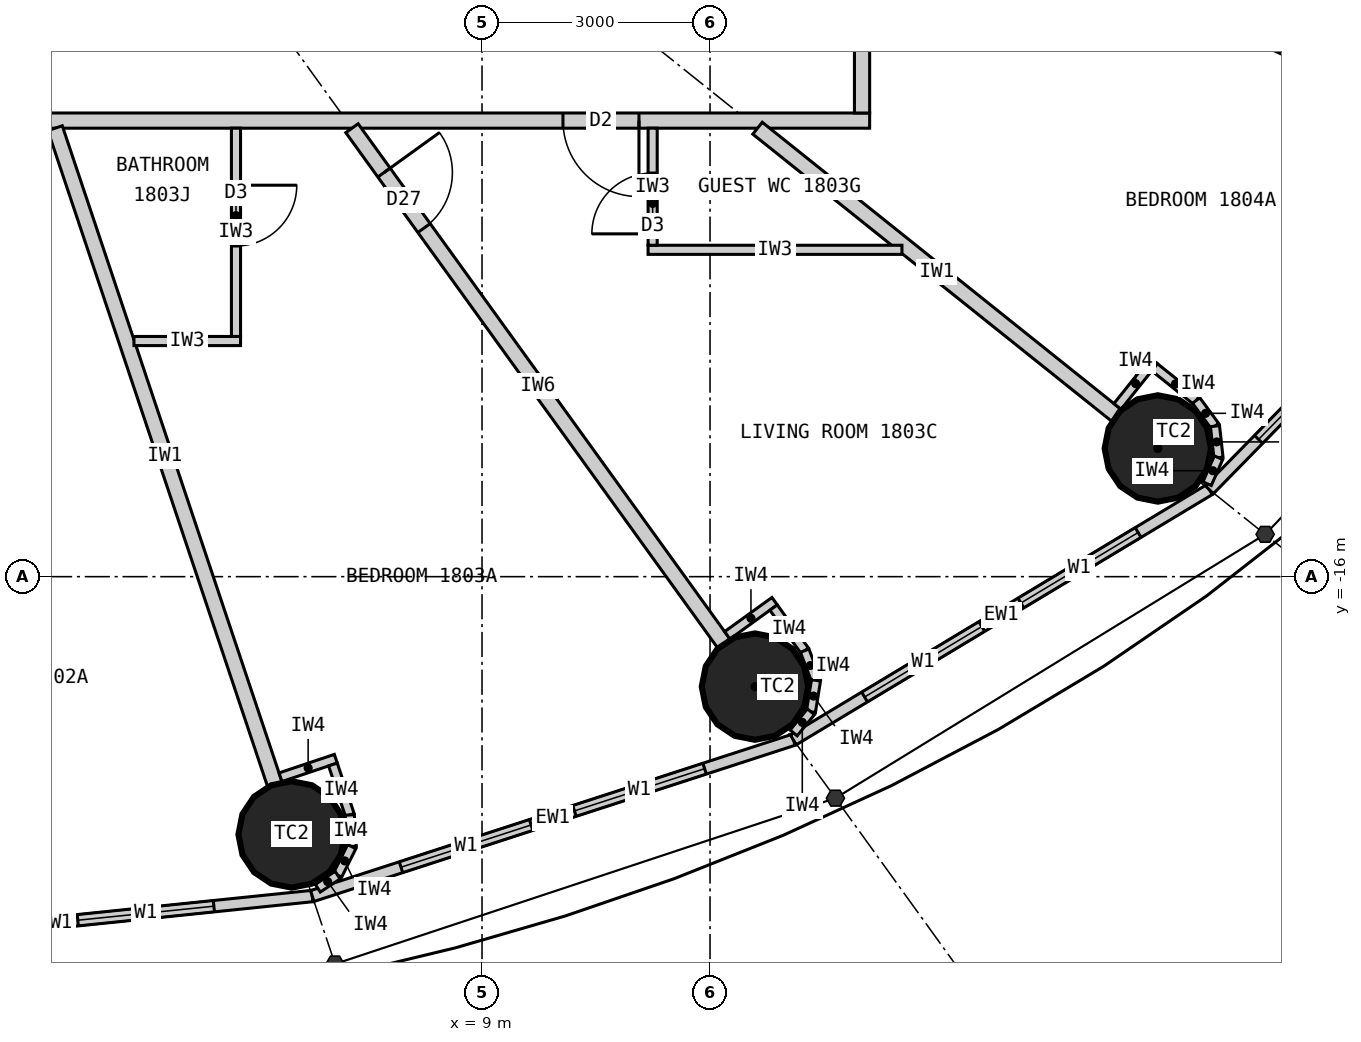
"""IFC4 building model, lengths in metres.
Left out: names, types, materials, properties, quantities, classifications, styles, units other than length and angle.
Written with IfcOpenShell. Run it as: python <this file> out.ifc"""

import sys

from ifc_helpers import new_model, si_unit, direction, frame, frame_2d, origin, origin_2d, place, context, subcontext, project, spatial, rectangle, circle, extrude, element, fill, save


model = new_model("IFC4")
c1 = context("Model", 3, precision=1e-05, world=origin(), true_north=direction((0.0, 1.0)))
c2 = subcontext(c1, "Body", "Model", "MODEL_VIEW")
j1 = project(units=[si_unit("LENGTHUNIT", "METRE"), si_unit("PLANEANGLEUNIT", "RADIAN")], contexts=[c1])
p1 = place(None, origin())
s1 = spatial("IfcSite", under=j1, at=p1, CompositionType="ELEMENT")
p2 = place(p1, origin())
s2 = spatial("IfcBuilding", under=s1, at=p2, CompositionType="ELEMENT")
p3 = place(p2, frame((0.0, 0.0, 73.8)))
s3 = spatial("IfcBuildingStorey", under=s2, at=p3, CompositionType="ELEMENT", Elevation=73.8)
for number, where, z_axis, x_axis in (
    (1, (6.495, -19.391, 0.0), (0.0, 0.0, 1.0), (1.0, 0.0, 0.0)),
    (2, (12.591, -17.447, 0.0), (0.0, 0.0, 1.0), (1.0, 0.0, 0.0)),
    (3, (17.892, -14.313, 0.0), (0.0, 0.0, 1.0), (1.0, 0.0, 0.0)),
):
    element("IfcColumn", number, at=place(p3, frame(where, z_axis=z_axis, x_axis=x_axis)), inside=s3, PredefinedType="COLUMN", context=c2, shape_type="SweptSolid", body=[
        extrude(circle(Radius=0.7, at=origin_2d()), origin(), (0.0, 0.0, 1.0), 3.3),
    ])
p4 = place(p3, frame((0.0, -20.9, 0.0), z_axis=(0.0, 0.0, 1.0), x_axis=(0.994721394369, 0.102612609291, 0.0)))
e4 = element("IfcWall", 4, at=p4, inside=s3, PredefinedType="ELEMENTEDWALL", context=c2, shape_type="SweptSolid", body=[
    extrude(rectangle(XDim=6.802, YDim=0.15, at=frame_2d((3.401, 0.0))), origin(), (0.0, 0.0, 1.0), 3.12),
])
p5 = place(p4, frame((1.301, 0.0, 0.9)))
e5 = element("IfcOpeningElement", 5, at=p5, cuts=e4, PredefinedType="OPENING", context=c2, shape_type="SweptSolid", body=[
    extrude(rectangle(XDim=1.8, YDim=1.9, at=frame_2d((0.9, 0.95))), frame((0.0, 0.085, 0.0), z_axis=(0.0, -1.0, 0.0), x_axis=(1.0, 0.0, 0.0)), (0.0, 0.0, 1.0), 0.17),
])
p6 = place(p4, frame((3.701, 0.0, 0.9)))
e6 = element("IfcOpeningElement", 6, at=p6, cuts=e4, PredefinedType="OPENING", context=c2, shape_type="SweptSolid", body=[
    extrude(rectangle(XDim=1.8, YDim=1.9, at=frame_2d((0.9, 0.95))), frame((0.0, 0.085, 0.0), z_axis=(0.0, -1.0, 0.0), x_axis=(1.0, 0.0, 0.0)), (0.0, 0.0, 1.0), 0.17),
])
p7 = place(p3, frame((6.766, -20.202, 0.0), z_axis=(0.0, 0.0, 1.0), x_axis=(0.951137534625, 0.308767534285, 0.0)))
e7 = element("IfcWall", 7, at=p7, inside=s3, PredefinedType="ELEMENTEDWALL", context=c2, shape_type="SweptSolid", body=[
    extrude(rectangle(XDim=6.655, YDim=0.15, at=frame_2d((3.328, 0.0))), origin(), (0.0, 0.0, 1.0), 3.12),
])
p8 = place(p7, frame((1.228, 0.0, 0.9)))
e8 = element("IfcOpeningElement", 8, at=p8, cuts=e7, PredefinedType="OPENING", context=c2, shape_type="SweptSolid", body=[
    extrude(rectangle(XDim=1.8, YDim=1.9, at=frame_2d((0.9, 0.95))), frame((0.0, 0.085, 0.0), z_axis=(0.0, -1.0, 0.0), x_axis=(1.0, 0.0, 0.0)), (0.0, 0.0, 1.0), 0.17),
])
p9 = place(p7, frame((3.628, 0.0, 0.9)))
e9 = element("IfcOpeningElement", 9, at=p9, cuts=e7, PredefinedType="OPENING", context=c2, shape_type="SweptSolid", body=[
    extrude(rectangle(XDim=1.8, YDim=1.9, at=frame_2d((0.9, 0.95))), frame((0.0, 0.085, 0.0), z_axis=(0.0, -1.0, 0.0), x_axis=(1.0, 0.0, 0.0)), (0.0, 0.0, 1.0), 0.17),
])
p10 = place(p3, frame((13.096, -18.147, 0.0), z_axis=(0.0, 0.0, 1.0), x_axis=(0.856983180864, 0.515344377787, 0.0)))
e10 = element("IfcWall", 10, at=p10, inside=s3, PredefinedType="ELEMENTEDWALL", context=c2, shape_type="SweptSolid", body=[
    extrude(rectangle(XDim=6.386, YDim=0.15, at=frame_2d((3.193, 0.0))), origin(), (0.0, 0.0, 1.0), 3.12),
])
p11 = place(p10, frame((1.093, 0.0, 0.9)))
e11 = element("IfcOpeningElement", 11, at=p11, cuts=e10, PredefinedType="OPENING", context=c2, shape_type="SweptSolid", body=[
    extrude(rectangle(XDim=1.8, YDim=1.9, at=frame_2d((0.9, 0.95))), frame((0.0, 0.085, 0.0), z_axis=(0.0, -1.0, 0.0), x_axis=(1.0, 0.0, 0.0)), (0.0, 0.0, 1.0), 0.17),
])
p12 = place(p10, frame((3.493, 0.0, 0.9)))
e12 = element("IfcOpeningElement", 12, at=p12, cuts=e10, PredefinedType="OPENING", context=c2, shape_type="SweptSolid", body=[
    extrude(rectangle(XDim=1.8, YDim=1.9, at=frame_2d((0.9, 0.95))), frame((0.0, 0.085, 0.0), z_axis=(0.0, -1.0, 0.0), x_axis=(1.0, 0.0, 0.0)), (0.0, 0.0, 1.0), 0.17),
])
p13 = place(p3, frame((18.57, -14.856, 0.0), z_axis=(0.0, 0.0, 1.0), x_axis=(0.699602905915, 0.714531856557, 0.0)))
e13 = element("IfcWall", 13, at=p13, inside=s3, PredefinedType="ELEMENTEDWALL", context=c2, shape_type="SweptSolid", body=[
    extrude(rectangle(XDim=6.051, YDim=0.15, at=frame_2d((3.025, 0.0))), origin(), (0.0, 0.0, 1.0), 3.12),
])
p14 = place(p13, frame((0.926, 0.0, 0.9)))
e14 = element("IfcOpeningElement", 14, at=p14, cuts=e13, PredefinedType="OPENING", context=c2, shape_type="SweptSolid", body=[
    extrude(rectangle(XDim=1.8, YDim=1.9, at=frame_2d((0.9, 0.95))), frame((0.0, 0.085, 0.0), z_axis=(0.0, -1.0, 0.0), x_axis=(1.0, 0.0, 0.0)), (0.0, 0.0, 1.0), 0.17),
])
p15 = place(p13, frame((3.325, 0.0, 0.9)))
e15 = element("IfcOpeningElement", 15, at=p15, cuts=e13, PredefinedType="OPENING", context=c2, shape_type="SweptSolid", body=[
    extrude(rectangle(XDim=1.8, YDim=1.9, at=frame_2d((0.9, 0.95))), frame((0.0, 0.085, 0.0), z_axis=(0.0, -1.0, 0.0), x_axis=(1.0, 0.0, 0.0)), (0.0, 0.0, 1.0), 0.17),
])
p16 = place(p3, frame((14.1, -10.0, 0.0), z_axis=(0.0, 0.0, 1.0), x_axis=(-1.0, 0.0, 0.0)))
e16 = element("IfcWall", 16, at=p16, inside=s3, PredefinedType="PARTITIONING", context=c2, shape_type="SweptSolid", body=[
    extrude(rectangle(XDim=28.2, YDim=0.2, at=frame_2d((14.1, 0.0))), origin(), (0.0, 0.0, 1.0), 3.12),
])
p17 = place(p16, frame((24.165, 0.0, 0.0)))
e17 = element("IfcOpeningElement", 17, at=p17, cuts=e16, PredefinedType="OPENING", context=c2, shape_type="SweptSolid", body=[
    extrude(rectangle(XDim=1.0, YDim=2.2, at=frame_2d((0.5, 1.1))), frame((0.0, 0.11, 0.0), z_axis=(0.0, -1.0, 0.0), x_axis=(1.0, 0.0, 0.0)), (0.0, 0.0, 1.0), 0.22),
])
p18 = place(p16, frame((14.923, 0.0, 0.0)))
e18 = element("IfcOpeningElement", 18, at=p18, cuts=e16, PredefinedType="OPENING", context=c2, shape_type="SweptSolid", body=[
    extrude(rectangle(XDim=1.0, YDim=2.2, at=frame_2d((0.5, 1.1))), frame((0.0, 0.11, 0.0), z_axis=(0.0, -1.0, 0.0), x_axis=(1.0, 0.0, 0.0)), (0.0, 0.0, 1.0), 0.22),
])
p19 = place(p16, frame((3.035, 0.0, 0.0)))
e19 = element("IfcOpeningElement", 19, at=p19, cuts=e16, PredefinedType="OPENING", context=c2, shape_type="SweptSolid", body=[
    extrude(rectangle(XDim=1.0, YDim=2.2, at=frame_2d((0.5, 1.1))), frame((0.0, 0.11, 0.0), z_axis=(0.0, -1.0, 0.0), x_axis=(1.0, 0.0, 0.0)), (0.0, 0.0, 1.0), 0.22),
])
p20 = place(p3, frame((3.383, -10.1, 0.0), z_axis=(0.0, 0.0, 1.0), x_axis=(0.31759592231, -0.948226149256, 0.0)))
e20 = element("IfcWall", 20, at=p20, inside=s3, PredefinedType="PARTITIONING", context=c2, shape_type="SweptSolid", body=[
    extrude(rectangle(XDim=9.098, YDim=0.2, at=frame_2d((4.549, 0.0))), origin(), (0.0, 0.0, 1.0), 2.32),
])
p21 = place(p3, frame((7.289, -10.1, 0.0), z_axis=(0.0, 0.0, 1.0), x_axis=(0.585198353053, -0.810890182197, 0.0)))
e21 = element("IfcWall", 21, at=p21, inside=s3, PredefinedType="PARTITIONING", context=c2, shape_type="SweptSolid", body=[
    extrude(rectangle(XDim=8.36, YDim=0.2, at=frame_2d((4.18, 0.0))), origin(), (0.0, 0.0, 1.0), 2.32),
])
p22 = place(p21, frame((0.72, 0.0, 0.0)))
e22 = element("IfcOpeningElement", 22, at=p22, cuts=e21, PredefinedType="OPENING", context=c2, shape_type="SweptSolid", body=[
    extrude(rectangle(XDim=0.9, YDim=2.1, at=frame_2d((0.45, 1.05))), frame((0.0, 0.11, 0.0), z_axis=(0.0, -1.0, 0.0), x_axis=(1.0, 0.0, 0.0)), (0.0, 0.0, 1.0), 0.22),
])
p23 = place(p3, frame((12.625, -10.1, 0.0), z_axis=(0.0, 0.0, 1.0), x_axis=(0.780892451574, -0.624665493744, 0.0)))
e23 = element("IfcWall", 23, at=p23, inside=s3, PredefinedType="PARTITIONING", context=c2, shape_type="SweptSolid", body=[
    extrude(rectangle(XDim=6.045, YDim=0.2, at=frame_2d((3.022, 0.0))), origin(), (0.0, 0.0, 1.0), 2.32),
])
p24 = place(p3, frame((14.1, -6.512, 0.0), z_axis=(0.0, 0.0, 1.0), x_axis=(0.907832871056, -0.419332181247, 0.0)))
e24 = element("IfcWall", 24, at=p24, inside=s3, PredefinedType="PARTITIONING", context=c2, shape_type="SweptSolid", body=[
    extrude(rectangle(XDim=8.023, YDim=0.2, at=frame_2d((4.011, 0.0))), origin(), (0.0, 0.0, 1.0), 2.32),
])
p25 = place(p24, frame((4.17, 0.0, 0.0)))
e25 = element("IfcOpeningElement", 25, at=p25, cuts=e24, PredefinedType="OPENING", context=c2, shape_type="SweptSolid", body=[
    extrude(rectangle(XDim=0.9, YDim=2.1, at=frame_2d((0.45, 1.05))), frame((0.0, 0.11, 0.0), z_axis=(0.0, -1.0, 0.0), x_axis=(1.0, 0.0, 0.0)), (0.0, 0.0, 1.0), 0.22),
])
p26 = place(p3, frame((4.421, -12.9, 0.0), z_axis=(0.0, 0.0, 1.0), x_axis=(1.0, 0.0, 0.0)))
e26 = element("IfcWall", 26, at=p26, inside=s3, PredefinedType="PARTITIONING", context=c2, shape_type="SweptSolid", body=[
    extrude(rectangle(XDim=1.402, YDim=0.12, at=frame_2d((0.701, 0.0))), origin(), (0.0, 0.0, 1.0), 3.12),
])
p27 = place(p3, frame((5.763, -10.1, 0.0), z_axis=(0.0, 0.0, 1.0), x_axis=(0.0, -1.0, 0.0)))
e27 = element("IfcWall", 27, at=p27, inside=s3, PredefinedType="PARTITIONING", context=c2, shape_type="SweptSolid", body=[
    extrude(rectangle(XDim=2.74, YDim=0.12, at=frame_2d((1.37, 0.0))), origin(), (0.0, 0.0, 1.0), 3.12),
])
p28 = place(p27, frame((0.75, 0.0, 0.0)))
e28 = element("IfcOpeningElement", 28, at=p28, cuts=e27, PredefinedType="OPENING", context=c2, shape_type="SweptSolid", body=[
    extrude(rectangle(XDim=0.8, YDim=2.1, at=frame_2d((0.4, 1.05))), frame((0.0, 0.07, 0.0), z_axis=(0.0, -1.0, 0.0), x_axis=(1.0, 0.0, 0.0)), (0.0, 0.0, 1.0), 0.14),
])
p29 = place(p3, frame((14.525, -11.7, 0.0), z_axis=(0.0, 0.0, 1.0), x_axis=(-1.0, 0.0, 0.0)))
e29 = element("IfcWall", 29, at=p29, inside=s3, PredefinedType="PARTITIONING", context=c2, shape_type="SweptSolid", body=[
    extrude(rectangle(XDim=3.34, YDim=0.12, at=frame_2d((1.67, 0.0))), origin(), (0.0, 0.0, 1.0), 3.12),
])
p30 = place(p3, frame((11.245, -10.1, 0.0), z_axis=(0.0, 0.0, 1.0), x_axis=(0.0, -1.0, 0.0)))
e30 = element("IfcWall", 30, at=p30, inside=s3, PredefinedType="PARTITIONING", context=c2, shape_type="SweptSolid", body=[
    extrude(rectangle(XDim=1.54, YDim=0.12, at=frame_2d((0.77, 0.0))), origin(), (0.0, 0.0, 1.0), 3.12),
])
p31 = place(p30, frame((0.59, 0.0, 0.0)))
e31 = element("IfcOpeningElement", 31, at=p31, cuts=e30, PredefinedType="OPENING", context=c2, shape_type="SweptSolid", body=[
    extrude(rectangle(XDim=0.8, YDim=2.1, at=frame_2d((0.4, 1.05))), frame((0.0, 0.07, 0.0), z_axis=(0.0, -1.0, 0.0), x_axis=(1.0, 0.0, 0.0)), (0.0, 0.0, 1.0), 0.14),
])
p32 = place(p3, frame((14.0, -9.9, 0.0), z_axis=(0.0, 0.0, 1.0), x_axis=(0.0, 1.0, 0.0)))
e32 = element("IfcWall", 32, at=p32, inside=s3, PredefinedType="PARTITIONING", context=c2, shape_type="SweptSolid", body=[
    extrude(rectangle(XDim=13.232, YDim=0.2, at=frame_2d((6.616, 0.0))), origin(), (0.0, 0.0, 1.0), 3.12),
])
p33 = place(p32, frame((4.948, 0.0, 0.0)))
e33 = element("IfcOpeningElement", 33, at=p33, cuts=e32, PredefinedType="OPENING", context=c2, shape_type="SweptSolid", body=[
    extrude(rectangle(XDim=1.0, YDim=2.2, at=frame_2d((0.5, 1.1))), frame((0.0, 0.11, 0.0), z_axis=(0.0, -1.0, 0.0), x_axis=(1.0, 0.0, 0.0)), (0.0, 0.0, 1.0), 0.22),
])
p34 = place(p32, frame((8.718, 0.0, 0.0)))
e34 = element("IfcOpeningElement", 34, at=p34, cuts=e32, PredefinedType="OPENING", context=c2, shape_type="SweptSolid", body=[
    extrude(rectangle(XDim=1.0, YDim=2.2, at=frame_2d((0.5, 1.1))), frame((0.0, 0.11, 0.0), z_axis=(0.0, -1.0, 0.0), x_axis=(1.0, 0.0, 0.0)), (0.0, 0.0, 1.0), 0.22),
])
p35 = place(p32, frame((11.74, 0.0, 0.0)))
e35 = element("IfcOpeningElement", 35, at=p35, cuts=e32, PredefinedType="OPENING", context=c2, shape_type="SweptSolid", body=[
    extrude(rectangle(XDim=1.0, YDim=2.2, at=frame_2d((0.5, 1.1))), frame((0.0, 0.11, 0.0), z_axis=(0.0, -1.0, 0.0), x_axis=(1.0, 0.0, 0.0)), (0.0, 0.0, 1.0), 0.22),
])
p36 = place(p3, frame((6.348, -18.639, 0.0), z_axis=(0.0, 0.0, 1.0), x_axis=(0.948268951266, 0.317468102437, 0.0)))
e36 = element("IfcWall", 36, at=p36, inside=s3, PredefinedType="PARTITIONING", context=c2, shape_type="SweptSolid", body=[
    extrude(rectangle(XDim=0.768, YDim=0.12, at=frame_2d((0.384, 0.0))), origin(), (0.0, 0.0, 1.0), 3.12),
])
p37 = place(p3, frame((7.038, -18.471, 0.0), z_axis=(0.0, 0.0, 1.0), x_axis=(0.317378466199, -0.9482989556, 0.0)))
e37 = element("IfcWall", 37, at=p37, inside=s3, PredefinedType="PARTITIONING", context=c2, shape_type="SweptSolid", body=[
    extrude(rectangle(XDim=0.7, YDim=0.12, at=frame_2d((0.35, 0.0))), origin(), (0.0, 0.0, 1.0), 3.12),
])
p38 = place(p3, frame((7.26, -19.135, 0.0), z_axis=(0.0, 0.0, 1.0), x_axis=(0.0613238046, -0.99811792439, 0.0)))
e38 = element("IfcWall", 38, at=p38, inside=s3, PredefinedType="PARTITIONING", context=c2, shape_type="SweptSolid", body=[
    extrude(rectangle(XDim=0.418, YDim=0.12, at=frame_2d((0.209, 0.0))), origin(), (0.0, 0.0, 1.0), 3.12),
])
p39 = place(p3, frame((7.286, -19.552, 0.0), z_axis=(0.0, 0.0, 1.0), x_axis=(-0.445810757773, -0.89512723579, 0.0)))
e39 = element("IfcWall", 39, at=p39, inside=s3, PredefinedType="PARTITIONING", context=c2, shape_type="SweptSolid", body=[
    extrude(rectangle(XDim=0.418, YDim=0.12, at=frame_2d((0.209, 0.0))), origin(), (0.0, 0.0, 1.0), 3.12),
])
p40 = place(p3, frame((7.1, -19.926, 0.0), z_axis=(0.0, 0.0, 1.0), x_axis=(-0.833488262509, -0.552537162787, 0.0)))
e40 = element("IfcWall", 40, at=p40, inside=s3, PredefinedType="PARTITIONING", context=c2, shape_type="SweptSolid", body=[
    extrude(rectangle(XDim=0.313, YDim=0.12, at=frame_2d((0.156, 0.0))), origin(), (0.0, 0.0, 1.0), 3.12),
])
p41 = place(p3, frame((12.227, -16.772, 0.0), z_axis=(0.0, 0.0, 1.0), x_axis=(0.810821798253, 0.585293098778, 0.0)))
e41 = element("IfcWall", 41, at=p41, inside=s3, PredefinedType="PARTITIONING", context=c2, shape_type="SweptSolid", body=[
    extrude(rectangle(XDim=0.768, YDim=0.12, at=frame_2d((0.384, 0.0))), origin(), (0.0, 0.0, 1.0), 3.12),
])
p42 = place(p3, frame((12.836, -16.406, 0.0), z_axis=(0.0, 0.0, 1.0), x_axis=(0.585223113993, -0.810872312296, 0.0)))
e42 = element("IfcWall", 42, at=p42, inside=s3, PredefinedType="PARTITIONING", context=c2, shape_type="SweptSolid", body=[
    extrude(rectangle(XDim=0.7, YDim=0.12, at=frame_2d((0.35, 0.0))), origin(), (0.0, 0.0, 1.0), 3.12),
])
p43 = place(p3, frame((13.246, -16.974, 0.0), z_axis=(0.0, 0.0, 1.0), x_axis=(0.355728122235, -0.934589483705, 0.0)))
e43 = element("IfcWall", 43, at=p43, inside=s3, PredefinedType="PARTITIONING", context=c2, shape_type="SweptSolid", body=[
    extrude(rectangle(XDim=0.418, YDim=0.12, at=frame_2d((0.209, 0.0))), origin(), (0.0, 0.0, 1.0), 3.12),
])
p44 = place(p3, frame((13.394, -17.365, 0.0), z_axis=(0.0, 0.0, 1.0), x_axis=(-0.159379276926, -0.987217425943, 0.0)))
e44 = element("IfcWall", 44, at=p44, inside=s3, PredefinedType="PARTITIONING", context=c2, shape_type="SweptSolid", body=[
    extrude(rectangle(XDim=0.418, YDim=0.12, at=frame_2d((0.209, 0.0))), origin(), (0.0, 0.0, 1.0), 3.12),
])
p45 = place(p3, frame((13.328, -17.777, 0.0), z_axis=(0.0, 0.0, 1.0), x_axis=(-0.632276783541, -0.774742582407, 0.0)))
e45 = element("IfcWall", 45, at=p45, inside=s3, PredefinedType="PARTITIONING", context=c2, shape_type="SweptSolid", body=[
    extrude(rectangle(XDim=0.36, YDim=0.12, at=frame_2d((0.18, 0.0))), origin(), (0.0, 0.0, 1.0), 3.12),
])
p46 = place(p3, frame((17.361, -13.76, 0.0), z_axis=(0.0, 0.0, 1.0), x_axis=(0.624501042889, 0.781023973659, 0.0)))
e46 = element("IfcWall", 46, at=p46, inside=s3, PredefinedType="PARTITIONING", context=c2, shape_type="SweptSolid", body=[
    extrude(rectangle(XDim=0.767, YDim=0.12, at=frame_2d((0.384, 0.0))), origin(), (0.0, 0.0, 1.0), 3.12),
])
p47 = place(p3, frame((17.85, -13.246, 0.0), z_axis=(0.0, 0.0, 1.0), x_axis=(0.780902834923, -0.62465251333, 0.0)))
e47 = element("IfcWall", 47, at=p47, inside=s3, PredefinedType="PARTITIONING", context=c2, shape_type="SweptSolid", body=[
    extrude(rectangle(XDim=0.7, YDim=0.12, at=frame_2d((0.35, 0.0))), origin(), (0.0, 0.0, 1.0), 3.12),
])
for number, where, z_axis, x_axis in (
    (48, (18.396, -13.683, 0.0), (0.0, 0.0, 1.0), (0.592, -0.806, 0.0)),
    (49, (18.644, -14.02, 0.0), (0.0, 0.0, 1.0), (0.11, -0.994, 0.0)),
):
    element("IfcWall", number, at=place(p3, frame(where, z_axis=z_axis, x_axis=x_axis)), inside=s3, PredefinedType="PARTITIONING", context=c2, shape_type="SweptSolid", body=[
        extrude(rectangle(XDim=0.418, YDim=0.12, at=frame_2d((0.209, 0.0))), origin(), (0.0, 0.0, 1.0), 3.12),
    ])
p48 = place(p3, frame((18.69, -14.435, 0.0), z_axis=(0.0, 0.0, 1.0), x_axis=(-0.401093412634, -0.91603715773, 0.0)))
e50 = element("IfcWall", 50, at=p48, inside=s3, PredefinedType="PARTITIONING", context=c2, shape_type="SweptSolid", body=[
    extrude(rectangle(XDim=0.373, YDim=0.12, at=frame_2d((0.187, 0.0))), origin(), (0.0, 0.0, 1.0), 3.12),
])
p49 = place(p6, origin())
e51 = element("IfcWindow", 51, at=p49, inside=s3, PartitioningType="SINGLE_PANEL", PredefinedType="WINDOW", context=c2, shape_type="SweptSolid", body=[
    extrude(rectangle(XDim=1.8, YDim=1.9, at=frame_2d((0.9, 0.95))), frame((0.0, 0.03, 0.0), z_axis=(0.0, -1.0, 0.0), x_axis=(1.0, 0.0, 0.0)), (0.0, 0.0, 1.0), 0.06),
])
fill(e6, e51)
p50 = place(p8, origin())
e52 = element("IfcWindow", 52, at=p50, inside=s3, PartitioningType="SINGLE_PANEL", PredefinedType="WINDOW", context=c2, shape_type="SweptSolid", body=[
    extrude(rectangle(XDim=1.8, YDim=1.9, at=frame_2d((0.9, 0.95))), frame((0.0, 0.03, 0.0), z_axis=(0.0, -1.0, 0.0), x_axis=(1.0, 0.0, 0.0)), (0.0, 0.0, 1.0), 0.06),
])
fill(e8, e52)
p51 = place(p9, origin())
e53 = element("IfcWindow", 53, at=p51, inside=s3, PartitioningType="SINGLE_PANEL", PredefinedType="WINDOW", context=c2, shape_type="SweptSolid", body=[
    extrude(rectangle(XDim=1.8, YDim=1.9, at=frame_2d((0.9, 0.95))), frame((0.0, 0.03, 0.0), z_axis=(0.0, -1.0, 0.0), x_axis=(1.0, 0.0, 0.0)), (0.0, 0.0, 1.0), 0.06),
])
fill(e9, e53)
p52 = place(p11, origin())
e54 = element("IfcWindow", 54, at=p52, inside=s3, PartitioningType="SINGLE_PANEL", PredefinedType="WINDOW", context=c2, shape_type="SweptSolid", body=[
    extrude(rectangle(XDim=1.8, YDim=1.9, at=frame_2d((0.9, 0.95))), frame((0.0, 0.03, 0.0), z_axis=(0.0, -1.0, 0.0), x_axis=(1.0, 0.0, 0.0)), (0.0, 0.0, 1.0), 0.06),
])
fill(e11, e54)
p53 = place(p12, origin())
e55 = element("IfcWindow", 55, at=p53, inside=s3, PartitioningType="SINGLE_PANEL", PredefinedType="WINDOW", context=c2, shape_type="SweptSolid", body=[
    extrude(rectangle(XDim=1.8, YDim=1.9, at=frame_2d((0.9, 0.95))), frame((0.0, 0.03, 0.0), z_axis=(0.0, -1.0, 0.0), x_axis=(1.0, 0.0, 0.0)), (0.0, 0.0, 1.0), 0.06),
])
fill(e12, e55)
p54 = place(p14, origin())
e56 = element("IfcWindow", 56, at=p54, inside=s3, PartitioningType="SINGLE_PANEL", PredefinedType="WINDOW", context=c2, shape_type="SweptSolid", body=[
    extrude(rectangle(XDim=1.8, YDim=1.9, at=frame_2d((0.9, 0.95))), frame((0.0, 0.03, 0.0), z_axis=(0.0, -1.0, 0.0), x_axis=(1.0, 0.0, 0.0)), (0.0, 0.0, 1.0), 0.06),
])
fill(e14, e56)
p55 = place(p28, origin())
e57 = element("IfcDoor", 57, at=p55, inside=s3, OperationType="SINGLE_SWING_LEFT", PredefinedType="DOOR", context=c2, shape_type="SweptSolid", body=[
    extrude(rectangle(XDim=0.8, YDim=2.1, at=frame_2d((0.4, 1.05))), frame((0.0, 0.025, 0.0), z_axis=(0.0, -1.0, 0.0), x_axis=(1.0, 0.0, 0.0)), (0.0, 0.0, 1.0), 0.05),
])
fill(e28, e57)
p56 = place(p31, origin())
e58 = element("IfcDoor", 58, at=p56, inside=s3, OperationType="SINGLE_SWING_RIGHT", PredefinedType="DOOR", context=c2, shape_type="SweptSolid", body=[
    extrude(rectangle(XDim=0.8, YDim=2.1, at=frame_2d((0.4, 1.05))), frame((0.0, 0.025, 0.0), z_axis=(0.0, -1.0, 0.0), x_axis=(1.0, 0.0, 0.0)), (0.0, 0.0, 1.0), 0.05),
])
fill(e31, e58)
p57 = place(p19, origin())
e59 = element("IfcDoor", 59, at=p57, inside=s3, OperationType="SINGLE_SWING_LEFT", PredefinedType="DOOR", context=c2, shape_type="SweptSolid", body=[
    extrude(rectangle(XDim=1.0, YDim=2.2, at=frame_2d((0.5, 1.1))), frame((0.0, 0.025, 0.0), z_axis=(0.0, -1.0, 0.0), x_axis=(1.0, 0.0, 0.0)), (0.0, 0.0, 1.0), 0.05),
])
fill(e19, e59)
p58 = place(p22, origin())
e60 = element("IfcDoor", 60, at=p58, inside=s3, OperationType="SINGLE_SWING_LEFT", PredefinedType="DOOR", context=c2, shape_type="SweptSolid", body=[
    extrude(rectangle(XDim=0.9, YDim=2.1, at=frame_2d((0.45, 1.05))), frame((0.0, 0.025, 0.0), z_axis=(0.0, -1.0, 0.0), x_axis=(1.0, 0.0, 0.0)), (0.0, 0.0, 1.0), 0.05),
])
fill(e22, e60)
save(model, sys.argv[1])
